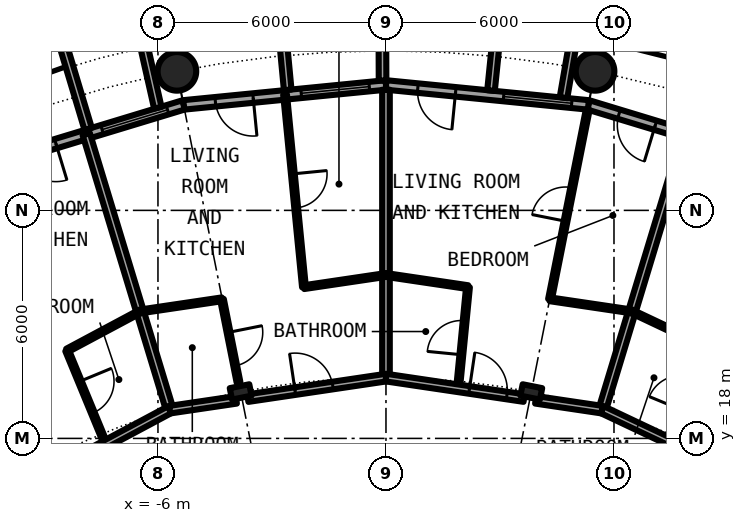
"""IFC4 building model, lengths in metres.
Left out: names, types, materials, properties, quantities, classifications, styles, units other than length and angle.
Written with IfcOpenShell. Run it as: python <this file> out.ifc"""

import sys

from ifc_helpers import new_model, si_unit, direction, frame, frame_2d, origin, origin_2d, place, context, subcontext, project, spatial, rectangle, hollow_circle, i_section, extrude, element, fill, save


model = new_model("IFC4")
c1 = context("Model", 3, precision=1e-05, world=origin(), true_north=direction((0.0, 1.0)))
c2 = subcontext(c1, "Body", "Model", "MODEL_VIEW")
j1 = project(units=[si_unit("LENGTHUNIT", "METRE"), si_unit("PLANEANGLEUNIT", "RADIAN")], contexts=[c1])
p1 = place(None, origin())
s1 = spatial("IfcSite", under=j1, at=p1, CompositionType="ELEMENT")
p2 = place(p1, origin())
s2 = spatial("IfcBuilding", under=s1, at=p2, CompositionType="ELEMENT")
p3 = place(p2, frame((0.0, 0.0, 75.8)))
s3 = spatial("IfcBuildingStorey", under=s2, at=p3, CompositionType="ELEMENT", Elevation=75.8)
for number, where, z_axis, x_axis in (
    (1, (5.501, 27.658, 0.0), (0.0, 0.0, 1.0), (1.0, 0.0, 0.0)),
    (2, (-5.501, 27.658, 0.0), (0.0, 0.0, 1.0), (1.0, 0.0, 0.0)),
):
    element("IfcColumn", number, at=place(p3, frame(where, z_axis=z_axis, x_axis=x_axis)), inside=s3, PredefinedType="COLUMN", context=c2, shape_type="SweptSolid", body=[
        extrude(hollow_circle(Radius=0.508, WallThickness=0.04, at=origin_2d()), origin(), (0.0, 0.0, 1.0), 3.05),
    ])
for number, where, z_axis, x_axis in (
    (3, (3.824, 19.223, 0.0), (0.0, 0.0, 1.0), (0.195, 0.981, 0.0)),
    (4, (-3.824, 19.223, 0.0), (0.0, 0.0, 1.0), (-0.195, 0.981, 0.0)),
):
    element("IfcColumn", number, at=place(p3, frame(where, z_axis=z_axis, x_axis=x_axis)), inside=s3, PredefinedType="COLUMN", context=c2, shape_type="SweptSolid", body=[
        extrude(i_section(OverallWidth=0.306, OverallDepth=0.524, WebThickness=0.021, FlangeThickness=0.04, FilletRadius=0.027, at=origin_2d()), origin(), (0.0, 0.0, 1.0), 3.05),
    ])
p4 = place(p3, frame((10.447, 25.222, 0.0), z_axis=(0.0, 0.0, 1.0), x_axis=(-0.956965678721, 0.290201119486, 0.0)))
e5 = element("IfcWall", 5, at=p4, inside=s3, PredefinedType="SOLIDWALL", context=c2, shape_type="SweptSolid", body=[
    extrude(rectangle(XDim=5.351, YDim=0.25, at=frame_2d((2.676, 0.0))), origin(), (0.0, 0.0, 1.0), 2.7),
])
p5 = place(p4, frame((0.441, 0.0, 0.3)))
e6 = element("IfcOpeningElement", 6, at=p5, cuts=e5, PredefinedType="OPENING", context=c2, shape_type="SweptSolid", body=[
    extrude(rectangle(XDim=1.8, YDim=2.1, at=frame_2d((0.9, 1.05))), frame((0.0, 0.135, 0.0), z_axis=(0.0, -1.0, 0.0), x_axis=(1.0, 0.0, 0.0)), (0.0, 0.0, 1.0), 0.27),
])
p6 = place(p4, frame((3.51, 0.0, 0.0)))
e7 = element("IfcOpeningElement", 7, at=p6, cuts=e5, PredefinedType="OPENING", context=c2, shape_type="SweptSolid", body=[
    extrude(rectangle(XDim=1.0, YDim=2.2, at=frame_2d((0.5, 1.1))), frame((0.0, 0.135, 0.0), z_axis=(0.0, -1.0, 0.0), x_axis=(1.0, 0.0, 0.0)), (0.0, 0.0, 1.0), 0.27),
])
p7 = place(p3, frame((5.326, 26.775, 0.0), z_axis=(0.0, 0.0, 1.0), x_axis=(-0.995173996315, 0.098126026407, 0.0)))
e8 = element("IfcWall", 8, at=p7, inside=s3, PredefinedType="SOLIDWALL", context=c2, shape_type="SweptSolid", body=[
    extrude(rectangle(XDim=5.352, YDim=0.25, at=frame_2d((2.676, 0.0))), origin(), (0.0, 0.0, 1.0), 2.7),
])
p8 = place(p7, frame((0.441, 0.0, 0.3)))
e9 = element("IfcOpeningElement", 9, at=p8, cuts=e8, PredefinedType="OPENING", context=c2, shape_type="SweptSolid", body=[
    extrude(rectangle(XDim=1.8, YDim=2.1, at=frame_2d((0.9, 1.05))), frame((0.0, 0.135, 0.0), z_axis=(0.0, -1.0, 0.0), x_axis=(1.0, 0.0, 0.0)), (0.0, 0.0, 1.0), 0.27),
])
p9 = place(p7, frame((3.51, 0.0, 0.0)))
e10 = element("IfcOpeningElement", 10, at=p9, cuts=e8, PredefinedType="OPENING", context=c2, shape_type="SweptSolid", body=[
    extrude(rectangle(XDim=1.0, YDim=2.2, at=frame_2d((0.5, 1.1))), frame((0.0, 0.135, 0.0), z_axis=(0.0, -1.0, 0.0), x_axis=(1.0, 0.0, 0.0)), (0.0, 0.0, 1.0), 0.27),
])
p10 = place(p3, frame((4.671, 26.966, -0.03), z_axis=(0.0, 0.0, 1.0), x_axis=(0.170539878907, 0.985350774954, 0.0)))
e11 = element("IfcWall", 11, at=p10, inside=s3, PredefinedType="SOLIDWALL", context=c2, shape_type="SweptSolid", body=[
    extrude(rectangle(XDim=2.932, YDim=0.2, at=frame_2d((1.466, 0.0))), origin(), (0.0, 0.0, 1.0), 2.73),
])
p11 = place(p3, frame((2.764, 27.153, -0.03), z_axis=(0.0, 0.0, 1.0), x_axis=(0.101505487237, 0.994834979311, 0.0)))
e12 = element("IfcWall", 12, at=p11, inside=s3, PredefinedType="SOLIDWALL", context=c2, shape_type="SweptSolid", body=[
    extrude(rectangle(XDim=3.007, YDim=0.2, at=frame_2d((1.503, 0.0))), origin(), (0.0, 0.0, 1.0), 2.73),
])
p12 = place(p3, frame((0.0, 27.3, 0.0), z_axis=(0.0, 0.0, 1.0), x_axis=(-0.995173996315, -0.098126026407, 0.0)))
e13 = element("IfcWall", 13, at=p12, inside=s3, PredefinedType="SOLIDWALL", context=c2, shape_type="SweptSolid", body=[
    extrude(rectangle(XDim=5.352, YDim=0.25, at=frame_2d((2.676, 0.0))), origin(), (0.0, 0.0, 1.0), 2.7),
])
p13 = place(p12, frame((0.441, 0.0, 0.3)))
e14 = element("IfcOpeningElement", 14, at=p13, cuts=e13, PredefinedType="OPENING", context=c2, shape_type="SweptSolid", body=[
    extrude(rectangle(XDim=1.8, YDim=2.1, at=frame_2d((0.9, 1.05))), frame((0.0, 0.135, 0.0), z_axis=(0.0, -1.0, 0.0), x_axis=(1.0, 0.0, 0.0)), (0.0, 0.0, 1.0), 0.27),
])
p14 = place(p12, frame((3.51, 0.0, 0.0)))
e15 = element("IfcOpeningElement", 15, at=p14, cuts=e13, PredefinedType="OPENING", context=c2, shape_type="SweptSolid", body=[
    extrude(rectangle(XDim=1.0, YDim=2.2, at=frame_2d((0.5, 1.1))), frame((0.0, 0.135, 0.0), z_axis=(0.0, -1.0, 0.0), x_axis=(1.0, 0.0, 0.0)), (0.0, 0.0, 1.0), 0.27),
])
p15 = place(p3, frame((-0.09, 27.417, -0.03), z_axis=(0.0, 0.0, 1.0), x_axis=(-0.00347308367, 0.999993968827, 0.0)))
e16 = element("IfcWall", 16, at=p15, inside=s3, PredefinedType="SOLIDWALL", context=c2, shape_type="SweptSolid", body=[
    extrude(rectangle(XDim=2.882, YDim=0.2, at=frame_2d((1.441, 0.0))), origin(), (0.0, 0.0, 1.0), 2.73),
])
p16 = place(p3, frame((-2.586, 27.171, -0.03), z_axis=(0.0, 0.0, 1.0), x_axis=(-0.094548432284, 0.995520262954, 0.0)))
e17 = element("IfcWall", 17, at=p16, inside=s3, PredefinedType="SOLIDWALL", context=c2, shape_type="SweptSolid", body=[
    extrude(rectangle(XDim=3.006, YDim=0.2, at=frame_2d((1.503, 0.0))), origin(), (0.0, 0.0, 1.0), 2.73),
])
p17 = place(p3, frame((-5.326, 26.775, 0.0), z_axis=(0.0, 0.0, 1.0), x_axis=(-0.956965678721, -0.290201119486, 0.0)))
e18 = element("IfcWall", 18, at=p17, inside=s3, PredefinedType="SOLIDWALL", context=c2, shape_type="SweptSolid", body=[
    extrude(rectangle(XDim=5.351, YDim=0.25, at=frame_2d((2.676, 0.0))), origin(), (0.0, 0.0, 1.0), 2.7),
])
p18 = place(p17, frame((0.441, 0.0, 0.3)))
e19 = element("IfcOpeningElement", 19, at=p18, cuts=e18, PredefinedType="OPENING", context=c2, shape_type="SweptSolid", body=[
    extrude(rectangle(XDim=1.8, YDim=2.1, at=frame_2d((0.9, 1.05))), frame((0.0, 0.135, 0.0), z_axis=(0.0, -1.0, 0.0), x_axis=(1.0, 0.0, 0.0)), (0.0, 0.0, 1.0), 0.27),
])
p19 = place(p17, frame((3.51, 0.0, 0.0)))
e20 = element("IfcOpeningElement", 20, at=p19, cuts=e18, PredefinedType="OPENING", context=c2, shape_type="SweptSolid", body=[
    extrude(rectangle(XDim=1.0, YDim=2.2, at=frame_2d((0.5, 1.1))), frame((0.0, 0.135, 0.0), z_axis=(0.0, -1.0, 0.0), x_axis=(1.0, 0.0, 0.0)), (0.0, 0.0, 1.0), 0.27),
])
p20 = place(p3, frame((-6.004, 26.7, -0.03), z_axis=(0.0, 0.0, 1.0), x_axis=(-0.219609259383, 0.975587911566, 0.0)))
e21 = element("IfcWall", 21, at=p20, inside=s3, PredefinedType="SOLIDWALL", context=c2, shape_type="SweptSolid", body=[
    extrude(rectangle(XDim=2.933, YDim=0.2, at=frame_2d((1.466, 0.0))), origin(), (0.0, 0.0, 1.0), 2.73),
])
p21 = place(p3, frame((-7.837, 26.144, -0.03), z_axis=(0.0, 0.0, 1.0), x_axis=(-0.287064767992, 0.957911174889, 0.0)))
e22 = element("IfcWall", 22, at=p21, inside=s3, PredefinedType="SOLIDWALL", context=c2, shape_type="SweptSolid", body=[
    extrude(rectangle(XDim=3.006, YDim=0.2, at=frame_2d((1.503, 0.0))), origin(), (0.0, 0.0, 1.0), 2.73),
])
for number, where, z_axis, x_axis in (
    (23, (-7.887, 26.005, 0.0), (0.0, 0.0, 1.0), (0.29, -0.957, 0.0)),
    (24, (5.69, 18.756, 0.0), (0.0, 0.0, 1.0), (0.29, 0.957, 0.0)),
):
    element("IfcWall", number, at=place(p3, frame(where, z_axis=z_axis, x_axis=x_axis)), inside=s3, PredefinedType="PARTITIONING", context=c2, shape_type="SweptSolid", body=[
        extrude(rectangle(XDim=7.574, YDim=0.2, at=frame_2d((3.787, 0.0))), origin(), (0.0, 0.0, 1.0), 2.7),
    ])
p22 = place(p3, frame((-8.392, 20.314, 0.0), z_axis=(0.0, 0.0, 1.0), x_axis=(0.38190329031, -0.924202292169, 0.0)))
e25 = element("IfcWall", 25, at=p22, inside=s3, PredefinedType="PARTITIONING", context=c2, shape_type="SweptSolid", body=[
    extrude(rectangle(XDim=2.661, YDim=0.1, at=frame_2d((1.33, 0.0))), origin(), (0.0, 0.0, 1.0), 2.7),
])
p23 = place(p22, frame((0.88, 0.0, 0.0)))
e26 = element("IfcOpeningElement", 26, at=p23, cuts=e25, PredefinedType="OPENING", context=c2, shape_type="SweptSolid", body=[
    extrude(rectangle(XDim=0.9, YDim=2.3, at=frame_2d((0.45, 1.15))), frame((0.0, 0.06, 0.0), z_axis=(0.0, -1.0, 0.0), x_axis=(1.0, 0.0, 0.0)), (0.0, 0.0, 1.0), 0.12),
])
p24 = place(p3, frame((-4.316, 21.66, 0.0), z_axis=(0.0, 0.0, 1.0), x_axis=(0.195524955938, -0.980698726218, 0.0)))
e27 = element("IfcWall", 27, at=p24, inside=s3, PredefinedType="PARTITIONING", context=c2, shape_type="SweptSolid", body=[
    extrude(rectangle(XDim=2.224, YDim=0.1, at=frame_2d((1.112, 0.0))), origin(), (0.0, 0.0, 1.0), 2.7),
])
p25 = place(p24, frame((0.887, 0.0, 0.0)))
e28 = element("IfcOpeningElement", 28, at=p25, cuts=e27, PredefinedType="OPENING", context=c2, shape_type="SweptSolid", body=[
    extrude(rectangle(XDim=0.9, YDim=2.3, at=frame_2d((0.45, 1.15))), frame((0.0, 0.06, 0.0), z_axis=(0.0, -1.0, 0.0), x_axis=(1.0, 0.0, 0.0)), (0.0, 0.0, 1.0), 0.12),
])
p26 = place(p3, frame((-2.655, 27.045, 0.0), z_axis=(0.0, 0.0, 1.0), x_axis=(0.097670180016, -0.995218838214, 0.0)))
e29 = element("IfcWall", 29, at=p26, inside=s3, PredefinedType="PARTITIONING", context=c2, shape_type="SweptSolid", body=[
    extrude(rectangle(XDim=5.089, YDim=0.1, at=frame_2d((2.545, 0.0))), origin(), (0.0, 0.0, 1.0), 2.7),
])
p27 = place(p26, frame((2.095, 0.0, 0.0)))
e30 = element("IfcOpeningElement", 30, at=p27, cuts=e29, PredefinedType="OPENING", context=c2, shape_type="SweptSolid", body=[
    extrude(rectangle(XDim=0.9, YDim=2.3, at=frame_2d((0.45, 1.15))), frame((0.0, 0.06, 0.0), z_axis=(0.0, -1.0, 0.0), x_axis=(1.0, 0.0, 0.0)), (0.0, 0.0, 1.0), 0.12),
])
p28 = place(p3, frame((0.0, 19.6, 0.0), z_axis=(0.0, 0.0, 1.0), x_axis=(0.0, 1.0, 0.0)))
e31 = element("IfcWall", 31, at=p28, inside=s3, PredefinedType="PARTITIONING", context=c2, shape_type="SweptSolid", body=[
    extrude(rectangle(XDim=7.575, YDim=0.2, at=frame_2d((3.788, 0.0))), origin(), (0.0, 0.0, 1.0), 2.7),
])
p29 = place(p3, frame((1.897, 19.319, 0.0), z_axis=(0.0, 0.0, 1.0), x_axis=(0.097613985845, 0.995224351474, 0.0)))
e32 = element("IfcWall", 32, at=p29, inside=s3, PredefinedType="PARTITIONING", context=c2, shape_type="SweptSolid", body=[
    extrude(rectangle(XDim=2.674, YDim=0.1, at=frame_2d((1.337, 0.0))), origin(), (0.0, 0.0, 1.0), 2.7),
])
p30 = place(p29, frame((0.887, 0.0, 0.0)))
e33 = element("IfcOpeningElement", 33, at=p30, cuts=e32, PredefinedType="OPENING", context=c2, shape_type="SweptSolid", body=[
    extrude(rectangle(XDim=0.9, YDim=2.3, at=frame_2d((0.45, 1.15))), frame((0.0, 0.06, 0.0), z_axis=(0.0, -1.0, 0.0), x_axis=(1.0, 0.0, 0.0)), (0.0, 0.0, 1.0), 0.12),
])
p31 = place(p3, frame((4.316, 21.66, 0.0), z_axis=(0.0, 0.0, 1.0), x_axis=(0.195350335681, 0.980733524638, 0.0)))
e34 = element("IfcWall", 34, at=p31, inside=s3, PredefinedType="PARTITIONING", context=c2, shape_type="SweptSolid", body=[
    extrude(rectangle(XDim=5.089, YDim=0.1, at=frame_2d((2.544, 0.0))), origin(), (0.0, 0.0, 1.0), 2.7),
])
p32 = place(p31, frame((2.095, 0.0, 0.0)))
e35 = element("IfcOpeningElement", 35, at=p32, cuts=e34, PredefinedType="OPENING", context=c2, shape_type="SweptSolid", body=[
    extrude(rectangle(XDim=0.9, YDim=2.3, at=frame_2d((0.45, 1.15))), frame((0.0, 0.06, 0.0), z_axis=(0.0, -1.0, 0.0), x_axis=(1.0, 0.0, 0.0)), (0.0, 0.0, 1.0), 0.12),
])
p33 = place(p3, frame((-12.434, 15.151, 0.0), z_axis=(0.0, 0.0, 1.0), x_axis=(0.881899173092, 0.47143806433, 0.0)))
e36 = element("IfcWall", 36, at=p33, inside=s3, PredefinedType="PARTITIONING", context=c2, shape_type="SweptSolid", body=[
    extrude(rectangle(XDim=7.647, YDim=0.2, at=frame_2d((3.824, 0.0))), origin(), (0.0, 0.0, 1.0), 2.38),
])
p34 = place(p33, frame((2.55, 0.0, 0.0)))
e37 = element("IfcOpeningElement", 37, at=p34, cuts=e36, PredefinedType="OPENING", context=c2, shape_type="SweptSolid", body=[
    extrude(rectangle(XDim=1.0, YDim=2.3, at=frame_2d((0.5, 1.15))), frame((0.0, 0.11, 0.0), z_axis=(0.0, -1.0, 0.0), x_axis=(1.0, 0.0, 0.0)), (0.0, 0.0, 1.0), 0.22),
])
p35 = place(p3, frame((-5.69, 18.756, 0.0), z_axis=(0.0, 0.0, 1.0), x_axis=(0.989265547993, 0.146128968906, 0.0)))
e38 = element("IfcWall", 38, at=p35, inside=s3, PredefinedType="PARTITIONING", context=c2, shape_type="SweptSolid", body=[
    extrude(rectangle(XDim=1.771, YDim=0.2, at=frame_2d((0.885, 0.0))), origin(), (0.0, 0.0, 1.0), 2.38),
])
p36 = place(p3, frame((-3.635, 19.06, 0.0), z_axis=(0.0, 0.0, 1.0), x_axis=(0.989179233347, 0.14671211373, 0.0)))
e39 = element("IfcWall", 39, at=p36, inside=s3, PredefinedType="PARTITIONING", context=c2, shape_type="SweptSolid", body=[
    extrude(rectangle(XDim=3.681, YDim=0.2, at=frame_2d((1.84, 0.0))), origin(), (0.0, 0.0, 1.0), 2.38),
])
p37 = place(p36, frame((1.258, 0.0, 0.0)))
e40 = element("IfcOpeningElement", 40, at=p37, cuts=e39, PredefinedType="OPENING", context=c2, shape_type="SweptSolid", body=[
    extrude(rectangle(XDim=1.0, YDim=2.3, at=frame_2d((0.5, 1.15))), frame((0.0, 0.11, 0.0), z_axis=(0.0, -1.0, 0.0), x_axis=(1.0, 0.0, 0.0)), (0.0, 0.0, 1.0), 0.22),
])
p38 = place(p3, frame((0.0, 19.6, 0.0), z_axis=(0.0, 0.0, 1.0), x_axis=(0.989182049247, -0.146693126787, 0.0)))
e41 = element("IfcWall", 41, at=p38, inside=s3, PredefinedType="PARTITIONING", context=c2, shape_type="SweptSolid", body=[
    extrude(rectangle(XDim=3.675, YDim=0.2, at=frame_2d((1.837, 0.0))), origin(), (0.0, 0.0, 1.0), 2.38),
])
p39 = place(p38, frame((2.216, 0.0, 0.0)))
e42 = element("IfcOpeningElement", 42, at=p39, cuts=e41, PredefinedType="OPENING", context=c2, shape_type="SweptSolid", body=[
    extrude(rectangle(XDim=1.0, YDim=2.3, at=frame_2d((0.5, 1.15))), frame((0.0, 0.11, 0.0), z_axis=(0.0, -1.0, 0.0), x_axis=(1.0, 0.0, 0.0)), (0.0, 0.0, 1.0), 0.22),
])
p40 = place(p3, frame((3.939, 19.016, 0.0), z_axis=(0.0, 0.0, 1.0), x_axis=(0.989153791914, -0.146883545509, 0.0)))
e43 = element("IfcWall", 43, at=p40, inside=s3, PredefinedType="PARTITIONING", context=c2, shape_type="SweptSolid", body=[
    extrude(rectangle(XDim=1.77, YDim=0.2, at=frame_2d((0.885, 0.0))), origin(), (0.0, 0.0, 1.0), 2.38),
])
p41 = place(p3, frame((5.69, 18.756, 0.0), z_axis=(0.0, 0.0, 1.0), x_axis=(0.903901201372, -0.427741298169, 0.0)))
e44 = element("IfcWall", 44, at=p41, inside=s3, PredefinedType="PARTITIONING", context=c2, shape_type="SweptSolid", body=[
    extrude(rectangle(XDim=5.597, YDim=0.2, at=frame_2d((2.798, 0.0))), origin(), (0.0, 0.0, 1.0), 2.38),
])
p42 = place(p41, frame((3.334, 0.0, 0.0)))
e45 = element("IfcOpeningElement", 45, at=p42, cuts=e44, PredefinedType="OPENING", context=c2, shape_type="SweptSolid", body=[
    extrude(rectangle(XDim=1.0, YDim=2.3, at=frame_2d((0.5, 1.15))), frame((0.0, 0.11, 0.0), z_axis=(0.0, -1.0, 0.0), x_axis=(1.0, 0.0, 0.0)), (0.0, 0.0, 1.0), 0.22),
])
p43 = place(p3, frame((-8.392, 20.314, 0.0), z_axis=(0.0, 0.0, 1.0), x_axis=(0.881864921102, 0.471502132476, 0.0)))
e46 = element("IfcWall", 46, at=p43, inside=s3, PredefinedType="PARTITIONING", context=c2, shape_type="SweptSolid", body=[
    extrude(rectangle(XDim=2.176, YDim=0.1, at=frame_2d((1.088, 0.0))), origin(), (0.0, 0.0, 1.0), 2.7),
])
p44 = place(p3, frame((-6.472, 21.34, 0.0), z_axis=(0.0, 0.0, 1.0), x_axis=(0.989185420695, 0.146670390618, 0.0)))
e47 = element("IfcWall", 47, at=p44, inside=s3, PredefinedType="PARTITIONING", context=c2, shape_type="SweptSolid", body=[
    extrude(rectangle(XDim=2.181, YDim=0.1, at=frame_2d((1.09, 0.0))), origin(), (0.0, 0.0, 1.0), 2.7),
])
for number, where, z_axis, x_axis in (
    (48, (-2.158, 21.98, 0.0), (0.0, 0.0, 1.0), (0.989, 0.147, 0.0)),
    (49, (0.0, 22.3, 0.0), (0.0, 0.0, 1.0), (0.989, -0.147, 0.0)),
):
    element("IfcWall", number, at=place(p3, frame(where, z_axis=z_axis, x_axis=x_axis)), inside=s3, PredefinedType="PARTITIONING", context=c2, shape_type="SweptSolid", body=[
        extrude(rectangle(XDim=2.182, YDim=0.1, at=frame_2d((1.091, 0.0))), origin(), (0.0, 0.0, 1.0), 2.7),
    ])
p45 = place(p3, frame((4.315, 21.66, 0.0), z_axis=(0.0, 0.0, 1.0), x_axis=(0.989185420695, -0.146670390618, 0.0)))
e50 = element("IfcWall", 50, at=p45, inside=s3, PredefinedType="PARTITIONING", context=c2, shape_type="SweptSolid", body=[
    extrude(rectangle(XDim=2.181, YDim=0.1, at=frame_2d((1.09, 0.0))), origin(), (0.0, 0.0, 1.0), 2.7),
])
p46 = place(p3, frame((6.464, 21.342, 0.0), z_axis=(0.0, 0.0, 1.0), x_axis=(0.904081702397, -0.427359655782, 0.0)))
e51 = element("IfcWall", 51, at=p46, inside=s3, PredefinedType="PARTITIONING", context=c2, shape_type="SweptSolid", body=[
    extrude(rectangle(XDim=2.181, YDim=0.1, at=frame_2d((1.091, 0.0))), origin(), (0.0, 0.0, 1.0), 2.7),
])
p47 = place(p6, origin())
e52 = element("IfcDoor", 52, at=p47, inside=s3, OperationType="SINGLE_SWING_LEFT", PredefinedType="DOOR", context=c2, shape_type="SweptSolid", body=[
    extrude(rectangle(XDim=1.0, YDim=2.2, at=frame_2d((0.5, 1.1))), frame((0.0, 0.025, 0.0), z_axis=(0.0, -1.0, 0.0), x_axis=(1.0, 0.0, 0.0)), (0.0, 0.0, 1.0), 0.05),
])
fill(e7, e52)
p48 = place(p8, origin())
e53 = element("IfcWindow", 53, at=p48, inside=s3, PartitioningType="SINGLE_PANEL", PredefinedType="WINDOW", context=c2, shape_type="SweptSolid", body=[
    extrude(rectangle(XDim=1.8, YDim=2.1, at=frame_2d((0.9, 1.05))), frame((0.0, 0.03, 0.0), z_axis=(0.0, -1.0, 0.0), x_axis=(1.0, 0.0, 0.0)), (0.0, 0.0, 1.0), 0.06),
])
fill(e9, e53)
p49 = place(p9, origin())
e54 = element("IfcDoor", 54, at=p49, inside=s3, OperationType="SINGLE_SWING_LEFT", PredefinedType="DOOR", context=c2, shape_type="SweptSolid", body=[
    extrude(rectangle(XDim=1.0, YDim=2.2, at=frame_2d((0.5, 1.1))), frame((0.0, 0.025, 0.0), z_axis=(0.0, -1.0, 0.0), x_axis=(1.0, 0.0, 0.0)), (0.0, 0.0, 1.0), 0.05),
])
fill(e10, e54)
p50 = place(p13, origin())
e55 = element("IfcWindow", 55, at=p50, inside=s3, PartitioningType="SINGLE_PANEL", PredefinedType="WINDOW", context=c2, shape_type="SweptSolid", body=[
    extrude(rectangle(XDim=1.8, YDim=2.1, at=frame_2d((0.9, 1.05))), frame((0.0, 0.03, 0.0), z_axis=(0.0, -1.0, 0.0), x_axis=(1.0, 0.0, 0.0)), (0.0, 0.0, 1.0), 0.06),
])
fill(e14, e55)
p51 = place(p14, origin())
e56 = element("IfcDoor", 56, at=p51, inside=s3, OperationType="SINGLE_SWING_LEFT", PredefinedType="DOOR", context=c2, shape_type="SweptSolid", body=[
    extrude(rectangle(XDim=1.0, YDim=2.2, at=frame_2d((0.5, 1.1))), frame((0.0, 0.025, 0.0), z_axis=(0.0, -1.0, 0.0), x_axis=(1.0, 0.0, 0.0)), (0.0, 0.0, 1.0), 0.05),
])
fill(e15, e56)
p52 = place(p18, origin())
e57 = element("IfcWindow", 57, at=p52, inside=s3, PartitioningType="SINGLE_PANEL", PredefinedType="WINDOW", context=c2, shape_type="SweptSolid", body=[
    extrude(rectangle(XDim=1.8, YDim=2.1, at=frame_2d((0.9, 1.05))), frame((0.0, 0.03, 0.0), z_axis=(0.0, -1.0, 0.0), x_axis=(1.0, 0.0, 0.0)), (0.0, 0.0, 1.0), 0.06),
])
fill(e19, e57)
p53 = place(p19, origin())
e58 = element("IfcDoor", 58, at=p53, inside=s3, OperationType="SINGLE_SWING_LEFT", PredefinedType="DOOR", context=c2, shape_type="SweptSolid", body=[
    extrude(rectangle(XDim=1.0, YDim=2.2, at=frame_2d((0.5, 1.1))), frame((0.0, 0.025, 0.0), z_axis=(0.0, -1.0, 0.0), x_axis=(1.0, 0.0, 0.0)), (0.0, 0.0, 1.0), 0.05),
])
fill(e20, e58)
p54 = place(p39, origin())
e59 = element("IfcDoor", 59, at=p54, inside=s3, OperationType="SINGLE_SWING_RIGHT", PredefinedType="DOOR", context=c2, shape_type="SweptSolid", body=[
    extrude(rectangle(XDim=1.0, YDim=2.3, at=frame_2d((0.5, 1.15))), frame((0.0, 0.025, 0.0), z_axis=(0.0, -1.0, 0.0), x_axis=(1.0, 0.0, 0.0)), (0.0, 0.0, 1.0), 0.05),
])
fill(e42, e59)
p55 = place(p30, origin())
e60 = element("IfcDoor", 60, at=p55, inside=s3, OperationType="SINGLE_SWING_RIGHT", PredefinedType="DOOR", context=c2, shape_type="SweptSolid", body=[
    extrude(rectangle(XDim=0.9, YDim=2.3, at=frame_2d((0.45, 1.15))), frame((0.0, 0.025, 0.0), z_axis=(0.0, -1.0, 0.0), x_axis=(1.0, 0.0, 0.0)), (0.0, 0.0, 1.0), 0.05),
])
fill(e33, e60)
p56 = place(p32, origin())
e61 = element("IfcDoor", 61, at=p56, inside=s3, OperationType="SINGLE_SWING_RIGHT", PredefinedType="DOOR", context=c2, shape_type="SweptSolid", body=[
    extrude(rectangle(XDim=0.9, YDim=2.3, at=frame_2d((0.45, 1.15))), frame((0.0, 0.025, 0.0), z_axis=(0.0, -1.0, 0.0), x_axis=(1.0, 0.0, 0.0)), (0.0, 0.0, 1.0), 0.05),
])
fill(e35, e61)
p57 = place(p37, origin())
e62 = element("IfcDoor", 62, at=p57, inside=s3, OperationType="SINGLE_SWING_LEFT", PredefinedType="DOOR", context=c2, shape_type="SweptSolid", body=[
    extrude(rectangle(XDim=1.0, YDim=2.3, at=frame_2d((0.5, 1.15))), frame((0.0, 0.025, 0.0), z_axis=(0.0, -1.0, 0.0), x_axis=(1.0, 0.0, 0.0)), (0.0, 0.0, 1.0), 0.05),
])
fill(e40, e62)
p58 = place(p25, origin())
e63 = element("IfcDoor", 63, at=p58, inside=s3, OperationType="SINGLE_SWING_RIGHT", PredefinedType="DOOR", context=c2, shape_type="SweptSolid", body=[
    extrude(rectangle(XDim=0.9, YDim=2.3, at=frame_2d((0.45, 1.15))), frame((0.0, 0.025, 0.0), z_axis=(0.0, -1.0, 0.0), x_axis=(1.0, 0.0, 0.0)), (0.0, 0.0, 1.0), 0.05),
])
fill(e28, e63)
p59 = place(p27, origin())
e64 = element("IfcDoor", 64, at=p59, inside=s3, OperationType="SINGLE_SWING_RIGHT", PredefinedType="DOOR", context=c2, shape_type="SweptSolid", body=[
    extrude(rectangle(XDim=0.9, YDim=2.3, at=frame_2d((0.45, 1.15))), frame((0.0, 0.025, 0.0), z_axis=(0.0, -1.0, 0.0), x_axis=(1.0, 0.0, 0.0)), (0.0, 0.0, 1.0), 0.05),
])
fill(e30, e64)
p60 = place(p23, origin())
e65 = element("IfcDoor", 65, at=p60, inside=s3, OperationType="SINGLE_SWING_RIGHT", PredefinedType="DOOR", context=c2, shape_type="SweptSolid", body=[
    extrude(rectangle(XDim=0.9, YDim=2.3, at=frame_2d((0.45, 1.15))), frame((0.0, 0.025, 0.0), z_axis=(0.0, -1.0, 0.0), x_axis=(1.0, 0.0, 0.0)), (0.0, 0.0, 1.0), 0.05),
])
fill(e26, e65)
save(model, sys.argv[1])
